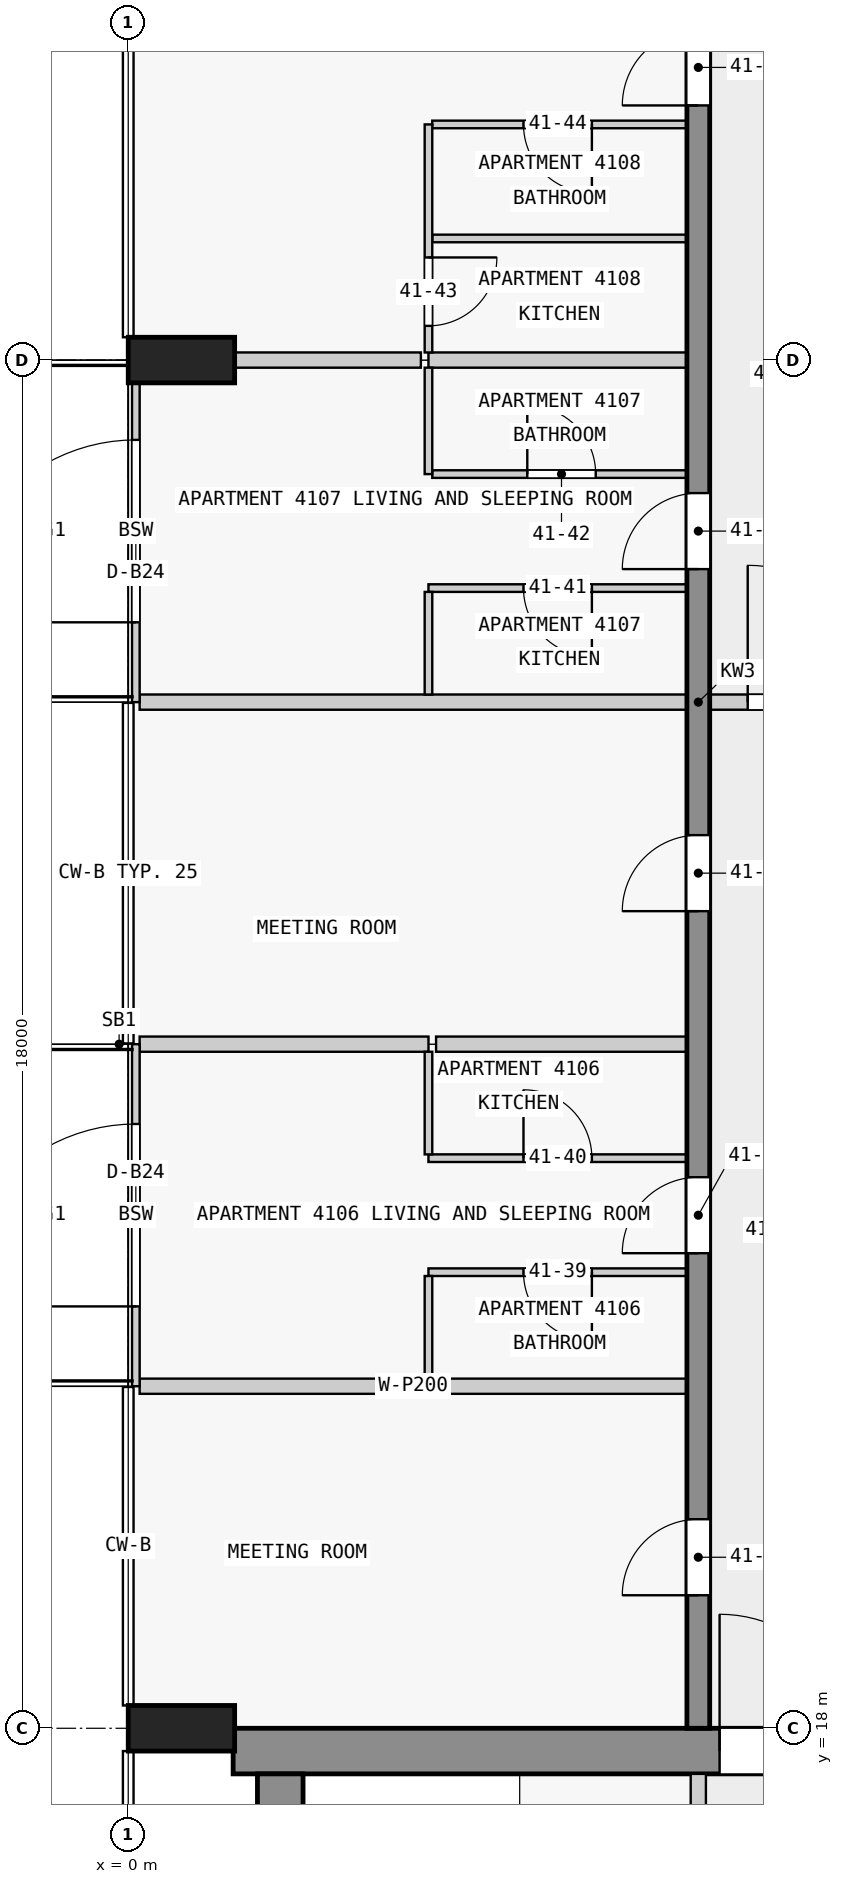
"""IFC4 building model, lengths in metres.
Left out: names, types, materials, properties, quantities, classifications, styles, units other than length and angle.
Written with IfcOpenShell. Run it as: python <this file> out.ifc"""

import sys

from ifc_helpers import new_model, si_unit, direction, frame, frame_2d, origin, origin_2d, place, context, subcontext, project, spatial, rectangle, extrude, element, fill, save


model = new_model("IFC4")
c1 = context("Model", 3, precision=1e-05, world=origin(), true_north=direction((0.0, 1.0)))
c2 = subcontext(c1, "Body", "Model", "MODEL_VIEW")
j1 = project(units=[si_unit("LENGTHUNIT", "METRE"), si_unit("PLANEANGLEUNIT", "RADIAN")], contexts=[c1])
p1 = place(None, origin())
s1 = spatial("IfcSite", under=j1, at=p1, CompositionType="ELEMENT")
p2 = place(p1, origin())
s2 = spatial("IfcBuilding", under=s1, at=p2, CompositionType="ELEMENT")
p3 = place(p2, frame((0.0, 0.0, 160.4)))
s3 = spatial("IfcBuildingStorey", under=s2, at=p3, CompositionType="ELEMENT", Elevation=160.4)
for number, where, z_axis, x_axis in (
    (1, (0.7, 36.0, 0.0), (0.0, 0.0, 1.0), (0.0, 1.0, 0.0)),
    (2, (0.7, 18.0, 0.0), (0.0, 0.0, 1.0), (0.0, 1.0, 0.0)),
):
    element("IfcColumn", number, at=place(p3, frame(where, z_axis=z_axis, x_axis=x_axis)), inside=s3, PredefinedType="COLUMN", context=c2, shape_type="SweptSolid", body=[
        extrude(rectangle(XDim=0.6, YDim=1.4, at=origin_2d()), origin(), (0.0, 0.0, 1.0), 3.5),
    ])
p4 = place(p3, frame((1.38, 17.7, 0.0), z_axis=(0.0, 0.0, 1.0), x_axis=(1.0, 0.0, 0.0)))
e3 = element("IfcWall", 3, at=p4, inside=s3, PredefinedType="SHEAR", context=c2, shape_type="SweptSolid", body=[
    extrude(rectangle(XDim=21.12, YDim=0.6, at=frame_2d((10.56, 0.0))), origin(), (0.0, 0.0, 1.0), 3.25),
])
p5 = place(p4, frame((6.4, 0.0, 0.0)))
e4 = element("IfcOpeningElement", 4, at=p5, cuts=e3, PredefinedType="OPENING", context=c2, shape_type="SweptSolid", body=[
    extrude(rectangle(XDim=1.8, YDim=2.1, at=frame_2d((0.9, 1.05))), frame((0.0, 0.31, 0.0), z_axis=(0.0, -1.0, 0.0), x_axis=(1.0, 0.0, 0.0)), (0.0, 0.0, 1.0), 0.62),
])
p6 = place(p3, frame((2.0, 2.5, 0.0), z_axis=(0.0, 0.0, 1.0), x_axis=(0.0, 1.0, 0.0)))
e5 = element("IfcWall", 5, at=p6, inside=s3, PredefinedType="SHEAR", context=c2, shape_type="SweptSolid", body=[
    extrude(rectangle(XDim=14.9, YDim=0.6, at=frame_2d((7.45, 0.0))), origin(), (0.0, 0.0, 1.0), 3.25),
])
p7 = place(p3, frame((7.5, 18.0, 0.0), z_axis=(0.0, 0.0, 1.0), x_axis=(0.0, 1.0, 0.0)))
e6 = element("IfcWall", 6, at=p7, inside=s3, PredefinedType="SHEAR", context=c2, shape_type="SweptSolid", body=[
    extrude(rectangle(XDim=27.0, YDim=0.3, at=frame_2d((13.5, 0.0))), origin(), (0.0, 0.0, 1.0), 3.25),
])
p8 = place(p7, frame((1.75, 0.0, 0.0)))
e7 = element("IfcOpeningElement", 7, at=p8, cuts=e6, PredefinedType="OPENING", context=c2, shape_type="SweptSolid", body=[
    extrude(rectangle(XDim=1.0, YDim=2.1, at=frame_2d((0.5, 1.05))), frame((0.0, 0.16, 0.0), z_axis=(0.0, -1.0, 0.0), x_axis=(1.0, 0.0, 0.0)), (0.0, 0.0, 1.0), 0.32),
])
p9 = place(p7, frame((6.25, 0.0, 0.0)))
e8 = element("IfcOpeningElement", 8, at=p9, cuts=e6, PredefinedType="OPENING", context=c2, shape_type="SweptSolid", body=[
    extrude(rectangle(XDim=1.0, YDim=2.1, at=frame_2d((0.5, 1.05))), frame((0.0, 0.16, 0.0), z_axis=(0.0, -1.0, 0.0), x_axis=(1.0, 0.0, 0.0)), (0.0, 0.0, 1.0), 0.32),
])
p10 = place(p7, frame((10.75, 0.0, 0.0)))
e9 = element("IfcOpeningElement", 9, at=p10, cuts=e6, PredefinedType="OPENING", context=c2, shape_type="SweptSolid", body=[
    extrude(rectangle(XDim=1.0, YDim=2.1, at=frame_2d((0.5, 1.05))), frame((0.0, 0.16, 0.0), z_axis=(0.0, -1.0, 0.0), x_axis=(1.0, 0.0, 0.0)), (0.0, 0.0, 1.0), 0.32),
])
p11 = place(p7, frame((15.25, 0.0, 0.0)))
e10 = element("IfcOpeningElement", 10, at=p11, cuts=e6, PredefinedType="OPENING", context=c2, shape_type="SweptSolid", body=[
    extrude(rectangle(XDim=1.0, YDim=2.1, at=frame_2d((0.5, 1.05))), frame((0.0, 0.16, 0.0), z_axis=(0.0, -1.0, 0.0), x_axis=(1.0, 0.0, 0.0)), (0.0, 0.0, 1.0), 0.32),
])
p12 = place(p7, frame((21.35, 0.0, 0.0)))
e11 = element("IfcOpeningElement", 11, at=p12, cuts=e6, PredefinedType="OPENING", context=c2, shape_type="SweptSolid", body=[
    extrude(rectangle(XDim=1.0, YDim=2.1, at=frame_2d((0.5, 1.05))), frame((0.0, 0.16, 0.0), z_axis=(0.0, -1.0, 0.0), x_axis=(1.0, 0.0, 0.0)), (0.0, 0.0, 1.0), 0.32),
])
p13 = place(p3, frame((0.1, 22.5, 0.0), z_axis=(0.0, 0.0, 1.0), x_axis=(0.0, 1.0, 0.0)))
e12 = element("IfcWall", 12, at=p13, inside=s3, PredefinedType="STANDARD", context=c2, shape_type="SweptSolid", body=[
    extrude(rectangle(XDim=4.5, YDim=0.1, at=frame_2d((2.25, 0.0))), origin(), (0.0, 0.0, 1.0), 3.25),
])
p14 = place(p13, frame((1.05, 0.0, 0.0)))
e13 = element("IfcOpeningElement", 13, at=p14, cuts=e12, PredefinedType="OPENING", context=c2, shape_type="SweptSolid", body=[
    extrude(rectangle(XDim=2.4, YDim=2.4, at=frame_2d((1.2, 1.2))), frame((0.0, 0.06, 0.0), z_axis=(0.0, -1.0, 0.0), x_axis=(1.0, 0.0, 0.0)), (0.0, 0.0, 1.0), 0.12),
])
p15 = place(p3, frame((0.1, 31.5, 0.0), z_axis=(0.0, 0.0, 1.0), x_axis=(0.0, 1.0, 0.0)))
e14 = element("IfcWall", 14, at=p15, inside=s3, PredefinedType="STANDARD", context=c2, shape_type="SweptSolid", body=[
    extrude(rectangle(XDim=4.5, YDim=0.1, at=frame_2d((2.25, 0.0))), origin(), (0.0, 0.0, 1.0), 3.25),
])
p16 = place(p15, frame((1.05, 0.0, 0.0)))
e15 = element("IfcOpeningElement", 15, at=p16, cuts=e14, PredefinedType="OPENING", context=c2, shape_type="SweptSolid", body=[
    extrude(rectangle(XDim=2.4, YDim=2.4, at=frame_2d((1.2, 1.2))), frame((0.0, 0.06, 0.0), z_axis=(0.0, -1.0, 0.0), x_axis=(1.0, 0.0, 0.0)), (0.0, 0.0, 1.0), 0.12),
])
p17 = place(p3, frame((7.5, 10.1, 0.0), z_axis=(0.0, 0.0, 1.0), x_axis=(0.0, 1.0, 0.0)))
e16 = element("IfcWall", 16, at=p17, inside=s3, PredefinedType="PARTITIONING", context=c2, shape_type="SweptSolid", body=[
    extrude(rectangle(XDim=7.3, YDim=0.2, at=frame_2d((3.65, 0.0))), origin(), (0.0, 0.0, 1.0), 3.25),
])
p18 = place(p17, frame((1.05, 0.0, 0.0)))
e17 = element("IfcOpeningElement", 17, at=p18, cuts=e16, PredefinedType="OPENING", context=c2, shape_type="SweptSolid", body=[
    extrude(rectangle(XDim=0.9, YDim=2.1, at=frame_2d((0.45, 1.05))), frame((0.0, 0.11, 0.0), z_axis=(0.0, -1.0, 0.0), x_axis=(1.0, 0.0, 0.0)), (0.0, 0.0, 1.0), 0.22),
])
p19 = place(p17, frame((4.7, 0.0, 0.0)))
e18 = element("IfcOpeningElement", 18, at=p19, cuts=e16, PredefinedType="OPENING", context=c2, shape_type="SweptSolid", body=[
    extrude(rectangle(XDim=0.9, YDim=2.1, at=frame_2d((0.45, 1.05))), frame((0.0, 0.11, 0.0), z_axis=(0.0, -1.0, 0.0), x_axis=(1.0, 0.0, 0.0)), (0.0, 0.0, 1.0), 0.22),
])
p20 = place(p3, frame((7.35, 22.5, 0.0), z_axis=(0.0, 0.0, 1.0), x_axis=(-1.0, 0.0, 0.0)))
e19 = element("IfcWall", 19, at=p20, inside=s3, PredefinedType="PARTITIONING", context=c2, shape_type="SweptSolid", body=[
    extrude(rectangle(XDim=7.2, YDim=0.2, at=frame_2d((3.6, 0.0))), origin(), (0.0, 0.0, 1.0), 3.25),
])
p21 = place(p3, frame((7.35, 24.0, 0.0), z_axis=(0.0, 0.0, 1.0), x_axis=(-1.0, 0.0, 0.0)))
e20 = element("IfcWall", 20, at=p21, inside=s3, PredefinedType="PARTITIONING", context=c2, shape_type="SweptSolid", body=[
    extrude(rectangle(XDim=3.4, YDim=0.1, at=frame_2d((1.7, 0.0))), origin(), (0.0, 0.0, 1.0), 3.25),
])
p22 = place(p21, frame((1.25, 0.0, 0.0)))
e21 = element("IfcOpeningElement", 21, at=p22, cuts=e20, PredefinedType="OPENING", context=c2, shape_type="SweptSolid", body=[
    extrude(rectangle(XDim=0.9, YDim=2.1, at=frame_2d((0.45, 1.05))), frame((0.0, 0.06, 0.0), z_axis=(0.0, -1.0, 0.0), x_axis=(1.0, 0.0, 0.0)), (0.0, 0.0, 1.0), 0.12),
])
p23 = place(p3, frame((3.95, 25.5, 0.0), z_axis=(0.0, 0.0, 1.0), x_axis=(1.0, 0.0, 0.0)))
e22 = element("IfcWall", 22, at=p23, inside=s3, PredefinedType="PARTITIONING", context=c2, shape_type="SweptSolid", body=[
    extrude(rectangle(XDim=3.4, YDim=0.1, at=frame_2d((1.7, 0.0))), origin(), (0.0, 0.0, 1.0), 3.25),
])
p24 = place(p23, frame((1.25, 0.0, 0.0)))
e23 = element("IfcOpeningElement", 23, at=p24, cuts=e22, PredefinedType="OPENING", context=c2, shape_type="SweptSolid", body=[
    extrude(rectangle(XDim=0.9, YDim=2.1, at=frame_2d((0.45, 1.05))), frame((0.0, 0.06, 0.0), z_axis=(0.0, -1.0, 0.0), x_axis=(1.0, 0.0, 0.0)), (0.0, 0.0, 1.0), 0.12),
])
p25 = place(p3, frame((7.35, 27.0, 0.0), z_axis=(0.0, 0.0, 1.0), x_axis=(-1.0, 0.0, 0.0)))
e24 = element("IfcWall", 24, at=p25, inside=s3, PredefinedType="PARTITIONING", context=c2, shape_type="SweptSolid", body=[
    extrude(rectangle(XDim=3.3, YDim=0.2, at=frame_2d((1.65, 0.0))), origin(), (0.0, 0.0, 1.0), 3.25),
])
p26 = place(p3, frame((0.15, 27.0, 0.0), z_axis=(0.0, 0.0, 1.0), x_axis=(1.0, 0.0, 0.0)))
e25 = element("IfcWall", 25, at=p26, inside=s3, PredefinedType="PARTITIONING", context=c2, shape_type="SweptSolid", body=[
    extrude(rectangle(XDim=3.8, YDim=0.2, at=frame_2d((1.9, 0.0))), origin(), (0.0, 0.0, 1.0), 3.25),
])
p27 = place(p3, frame((7.35, 31.5, 0.0), z_axis=(0.0, 0.0, 1.0), x_axis=(-1.0, 0.0, 0.0)))
e26 = element("IfcWall", 26, at=p27, inside=s3, PredefinedType="PARTITIONING", context=c2, shape_type="SweptSolid", body=[
    extrude(rectangle(XDim=7.2, YDim=0.2, at=frame_2d((3.6, 0.0))), origin(), (0.0, 0.0, 1.0), 3.25),
])
p28 = place(p3, frame((7.35, 33.0, 0.0), z_axis=(0.0, 0.0, 1.0), x_axis=(-1.0, 0.0, 0.0)))
e27 = element("IfcWall", 27, at=p28, inside=s3, PredefinedType="PARTITIONING", context=c2, shape_type="SweptSolid", body=[
    extrude(rectangle(XDim=3.4, YDim=0.1, at=frame_2d((1.7, 0.0))), origin(), (0.0, 0.0, 1.0), 3.25),
])
p29 = place(p28, frame((1.25, 0.0, 0.0)))
e28 = element("IfcOpeningElement", 28, at=p29, cuts=e27, PredefinedType="OPENING", context=c2, shape_type="SweptSolid", body=[
    extrude(rectangle(XDim=0.9, YDim=2.1, at=frame_2d((0.45, 1.05))), frame((0.0, 0.06, 0.0), z_axis=(0.0, -1.0, 0.0), x_axis=(1.0, 0.0, 0.0)), (0.0, 0.0, 1.0), 0.12),
])
p30 = place(p3, frame((4.0, 34.5, 0.0), z_axis=(0.0, 0.0, 1.0), x_axis=(1.0, 0.0, 0.0)))
e29 = element("IfcWall", 29, at=p30, inside=s3, PredefinedType="PARTITIONING", context=c2, shape_type="SweptSolid", body=[
    extrude(rectangle(XDim=3.35, YDim=0.1, at=frame_2d((1.675, 0.0))), origin(), (0.0, 0.0, 1.0), 3.25),
])
p31 = place(p30, frame((1.25, 0.0, 0.0)))
e30 = element("IfcOpeningElement", 30, at=p31, cuts=e29, PredefinedType="OPENING", context=c2, shape_type="SweptSolid", body=[
    extrude(rectangle(XDim=0.9, YDim=2.1, at=frame_2d((0.45, 1.05))), frame((0.0, 0.06, 0.0), z_axis=(0.0, -1.0, 0.0), x_axis=(1.0, 0.0, 0.0)), (0.0, 0.0, 1.0), 0.12),
])
p32 = place(p3, frame((7.35, 36.0, 0.0), z_axis=(0.0, 0.0, 1.0), x_axis=(-1.0, 0.0, 0.0)))
e31 = element("IfcWall", 31, at=p32, inside=s3, PredefinedType="PARTITIONING", context=c2, shape_type="SweptSolid", body=[
    extrude(rectangle(XDim=3.4, YDim=0.2, at=frame_2d((1.7, 0.0))), origin(), (0.0, 0.0, 1.0), 3.25),
])
p33 = place(p3, frame((1.4, 36.0, 0.0), z_axis=(0.0, 0.0, 1.0), x_axis=(1.0, 0.0, 0.0)))
e32 = element("IfcWall", 32, at=p33, inside=s3, PredefinedType="PARTITIONING", context=c2, shape_type="SweptSolid", body=[
    extrude(rectangle(XDim=2.45, YDim=0.2, at=frame_2d((1.225, 0.0))), origin(), (0.0, 0.0, 1.0), 3.25),
])
p34 = place(p3, frame((7.35, 37.6, 0.0), z_axis=(0.0, 0.0, 1.0), x_axis=(-1.0, 0.0, 0.0)))
e33 = element("IfcWall", 33, at=p34, inside=s3, PredefinedType="PARTITIONING", context=c2, shape_type="SweptSolid", body=[
    extrude(rectangle(XDim=3.35, YDim=0.1, at=frame_2d((1.675, 0.0))), origin(), (0.0, 0.0, 1.0), 3.25),
])
p35 = place(p3, frame((7.35, 39.1, 0.0), z_axis=(0.0, 0.0, 1.0), x_axis=(-1.0, 0.0, 0.0)))
e34 = element("IfcWall", 34, at=p35, inside=s3, PredefinedType="PARTITIONING", context=c2, shape_type="SweptSolid", body=[
    extrude(rectangle(XDim=3.35, YDim=0.1, at=frame_2d((1.675, 0.0))), origin(), (0.0, 0.0, 1.0), 3.25),
])
p36 = place(p35, frame((1.25, 0.0, 0.0)))
e35 = element("IfcOpeningElement", 35, at=p36, cuts=e34, PredefinedType="OPENING", context=c2, shape_type="SweptSolid", body=[
    extrude(rectangle(XDim=0.9, YDim=2.1, at=frame_2d((0.45, 1.05))), frame((0.0, 0.06, 0.0), z_axis=(0.0, -1.0, 0.0), x_axis=(1.0, 0.0, 0.0)), (0.0, 0.0, 1.0), 0.12),
])
for number, where, z_axis, x_axis in (
    (36, (3.95, 23.95, 0.0), (0.0, 0.0, 1.0), (0.0, -1.0, 0.0)),
    (37, (3.95, 26.9, 0.0), (0.0, 0.0, 1.0), (0.0, -1.0, 0.0)),
    (38, (3.95, 32.95, 0.0), (0.0, 0.0, 1.0), (0.0, -1.0, 0.0)),
):
    element("IfcWall", number, at=place(p3, frame(where, z_axis=z_axis, x_axis=x_axis)), inside=s3, PredefinedType="PARTITIONING", context=c2, shape_type="SweptSolid", body=[
        extrude(rectangle(XDim=1.35, YDim=0.1, at=frame_2d((0.675, 0.0))), origin(), (0.0, 0.0, 1.0), 3.25),
    ])
p37 = place(p3, frame((3.95, 35.9, 0.0), z_axis=(0.0, 0.0, 1.0), x_axis=(0.0, -1.0, 0.0)))
e39 = element("IfcWall", 39, at=p37, inside=s3, PredefinedType="PARTITIONING", context=c2, shape_type="SweptSolid", body=[
    extrude(rectangle(XDim=1.4, YDim=0.1, at=frame_2d((0.7, 0.0))), origin(), (0.0, 0.0, 1.0), 3.25),
])
p38 = place(p3, frame((3.95, 39.1, 0.0), z_axis=(0.0, 0.0, 1.0), x_axis=(0.0, -1.0, 0.0)))
e40 = element("IfcWall", 40, at=p38, inside=s3, PredefinedType="PARTITIONING", context=c2, shape_type="SweptSolid", body=[
    extrude(rectangle(XDim=3.0, YDim=0.1, at=frame_2d((1.5, 0.0))), origin(), (0.0, 0.0, 1.0), 3.25),
])
p39 = place(p38, frame((1.75, 0.0, 0.0)))
e41 = element("IfcOpeningElement", 41, at=p39, cuts=e40, PredefinedType="OPENING", context=c2, shape_type="SweptSolid", body=[
    extrude(rectangle(XDim=0.9, YDim=2.1, at=frame_2d((0.45, 1.05))), frame((0.0, 0.06, 0.0), z_axis=(0.0, -1.0, 0.0), x_axis=(1.0, 0.0, 0.0)), (0.0, 0.0, 1.0), 0.12),
])
p40 = place(p3, frame((7.45, 31.5, 0.0), z_axis=(0.0, 0.0, 1.0), x_axis=(1.0, 0.0, 0.0)))
e42 = element("IfcWall", 42, at=p40, inside=s3, PredefinedType="PARTITIONING", context=c2, shape_type="SweptSolid", body=[
    extrude(rectangle(XDim=3.1, YDim=0.2, at=frame_2d((1.55, 0.0))), origin(), (0.0, 0.0, 1.0), 3.25),
])
p41 = place(p40, frame((0.7, 0.0, 0.0)))
e43 = element("IfcOpeningElement", 43, at=p41, cuts=e42, PredefinedType="OPENING", context=c2, shape_type="SweptSolid", body=[
    extrude(rectangle(XDim=1.8, YDim=2.1, at=frame_2d((0.9, 1.05))), frame((0.0, 0.11, 0.0), z_axis=(0.0, -1.0, 0.0), x_axis=(1.0, 0.0, 0.0)), (0.0, 0.0, 1.0), 0.22),
])
p42 = place(p14, origin())
e44 = element("IfcDoor", 44, at=p42, inside=s3, OperationType="SINGLE_SWING_LEFT", PredefinedType="DOOR", context=c2, shape_type="SweptSolid", body=[
    extrude(rectangle(XDim=2.4, YDim=2.4, at=frame_2d((1.2, 1.2))), frame((0.0, 0.025, 0.0), z_axis=(0.0, -1.0, 0.0), x_axis=(1.0, 0.0, 0.0)), (0.0, 0.0, 1.0), 0.05),
])
fill(e13, e44)
p43 = place(p16, origin())
e45 = element("IfcDoor", 45, at=p43, inside=s3, OperationType="SINGLE_SWING_LEFT", PredefinedType="DOOR", context=c2, shape_type="SweptSolid", body=[
    extrude(rectangle(XDim=2.4, YDim=2.4, at=frame_2d((1.2, 1.2))), frame((0.0, 0.025, 0.0), z_axis=(0.0, -1.0, 0.0), x_axis=(1.0, 0.0, 0.0)), (0.0, 0.0, 1.0), 0.05),
])
fill(e15, e45)
p44 = place(p5, origin())
e46 = element("IfcDoor", 46, at=p44, inside=s3, OperationType="DOUBLE_DOOR_SINGLE_SWING", PredefinedType="DOOR", context=c2, shape_type="SweptSolid", body=[
    extrude(rectangle(XDim=1.8, YDim=2.1, at=frame_2d((0.9, 1.05))), frame((0.0, 0.025, 0.0), z_axis=(0.0, -1.0, 0.0), x_axis=(1.0, 0.0, 0.0)), (0.0, 0.0, 1.0), 0.05),
])
fill(e4, e46)
p45 = place(p8, origin())
e47 = element("IfcDoor", 47, at=p45, inside=s3, OperationType="SINGLE_SWING_LEFT", PredefinedType="DOOR", context=c2, shape_type="SweptSolid", body=[
    extrude(rectangle(XDim=1.0, YDim=2.1, at=frame_2d((0.5, 1.05))), frame((0.0, 0.025, 0.0), z_axis=(0.0, -1.0, 0.0), x_axis=(1.0, 0.0, 0.0)), (0.0, 0.0, 1.0), 0.05),
])
fill(e7, e47)
p46 = place(p9, origin())
e48 = element("IfcDoor", 48, at=p46, inside=s3, OperationType="SINGLE_SWING_LEFT", PredefinedType="DOOR", context=c2, shape_type="SweptSolid", body=[
    extrude(rectangle(XDim=1.0, YDim=2.1, at=frame_2d((0.5, 1.05))), frame((0.0, 0.025, 0.0), z_axis=(0.0, -1.0, 0.0), x_axis=(1.0, 0.0, 0.0)), (0.0, 0.0, 1.0), 0.05),
])
fill(e8, e48)
p47 = place(p10, origin())
e49 = element("IfcDoor", 49, at=p47, inside=s3, OperationType="SINGLE_SWING_LEFT", PredefinedType="DOOR", context=c2, shape_type="SweptSolid", body=[
    extrude(rectangle(XDim=1.0, YDim=2.1, at=frame_2d((0.5, 1.05))), frame((0.0, 0.025, 0.0), z_axis=(0.0, -1.0, 0.0), x_axis=(1.0, 0.0, 0.0)), (0.0, 0.0, 1.0), 0.05),
])
fill(e9, e49)
p48 = place(p11, origin())
e50 = element("IfcDoor", 50, at=p48, inside=s3, OperationType="SINGLE_SWING_RIGHT", PredefinedType="DOOR", context=c2, shape_type="SweptSolid", body=[
    extrude(rectangle(XDim=1.0, YDim=2.1, at=frame_2d((0.5, 1.05))), frame((0.0, 0.025, 0.0), z_axis=(0.0, -1.0, 0.0), x_axis=(1.0, 0.0, 0.0)), (0.0, 0.0, 1.0), 0.05),
])
fill(e10, e50)
p49 = place(p12, origin())
e51 = element("IfcDoor", 51, at=p49, inside=s3, OperationType="SINGLE_SWING_RIGHT", PredefinedType="DOOR", context=c2, shape_type="SweptSolid", body=[
    extrude(rectangle(XDim=1.0, YDim=2.1, at=frame_2d((0.5, 1.05))), frame((0.0, 0.025, 0.0), z_axis=(0.0, -1.0, 0.0), x_axis=(1.0, 0.0, 0.0)), (0.0, 0.0, 1.0), 0.05),
])
fill(e11, e51)
p50 = place(p41, origin())
e52 = element("IfcDoor", 52, at=p50, inside=s3, OperationType="SINGLE_SWING_RIGHT", PredefinedType="DOOR", context=c2, shape_type="SweptSolid", body=[
    extrude(rectangle(XDim=1.8, YDim=2.1, at=frame_2d((0.9, 1.05))), frame((0.0, 0.025, 0.0), z_axis=(0.0, -1.0, 0.0), x_axis=(1.0, 0.0, 0.0)), (0.0, 0.0, 1.0), 0.05),
])
fill(e43, e52)
p51 = place(p22, origin())
e53 = element("IfcDoor", 53, at=p51, inside=s3, OperationType="SINGLE_SWING_RIGHT", PredefinedType="DOOR", context=c2, shape_type="SweptSolid", body=[
    extrude(rectangle(XDim=0.9, YDim=2.1, at=frame_2d((0.45, 1.05))), frame((0.0, 0.025, 0.0), z_axis=(0.0, -1.0, 0.0), x_axis=(1.0, 0.0, 0.0)), (0.0, 0.0, 1.0), 0.05),
])
fill(e21, e53)
p52 = place(p24, origin())
e54 = element("IfcDoor", 54, at=p52, inside=s3, OperationType="SINGLE_SWING_RIGHT", PredefinedType="DOOR", context=c2, shape_type="SweptSolid", body=[
    extrude(rectangle(XDim=0.9, YDim=2.1, at=frame_2d((0.45, 1.05))), frame((0.0, 0.025, 0.0), z_axis=(0.0, -1.0, 0.0), x_axis=(1.0, 0.0, 0.0)), (0.0, 0.0, 1.0), 0.05),
])
fill(e23, e54)
p53 = place(p29, origin())
e55 = element("IfcDoor", 55, at=p53, inside=s3, OperationType="SINGLE_SWING_RIGHT", PredefinedType="DOOR", context=c2, shape_type="SweptSolid", body=[
    extrude(rectangle(XDim=0.9, YDim=2.1, at=frame_2d((0.45, 1.05))), frame((0.0, 0.025, 0.0), z_axis=(0.0, -1.0, 0.0), x_axis=(1.0, 0.0, 0.0)), (0.0, 0.0, 1.0), 0.05),
])
fill(e28, e55)
p54 = place(p31, origin())
e56 = element("IfcDoor", 56, at=p54, inside=s3, OperationType="SINGLE_SWING_RIGHT", PredefinedType="DOOR", context=c2, shape_type="SweptSolid", body=[
    extrude(rectangle(XDim=0.9, YDim=2.1, at=frame_2d((0.45, 1.05))), frame((0.0, 0.025, 0.0), z_axis=(0.0, -1.0, 0.0), x_axis=(1.0, 0.0, 0.0)), (0.0, 0.0, 1.0), 0.05),
])
fill(e30, e56)
p55 = place(p39, origin())
e57 = element("IfcDoor", 57, at=p55, inside=s3, OperationType="SINGLE_SWING_RIGHT", PredefinedType="DOOR", context=c2, shape_type="SweptSolid", body=[
    extrude(rectangle(XDim=0.9, YDim=2.1, at=frame_2d((0.45, 1.05))), frame((0.0, 0.025, 0.0), z_axis=(0.0, -1.0, 0.0), x_axis=(1.0, 0.0, 0.0)), (0.0, 0.0, 1.0), 0.05),
])
fill(e41, e57)
p56 = place(p36, origin())
e58 = element("IfcDoor", 58, at=p56, inside=s3, OperationType="SINGLE_SWING_RIGHT", PredefinedType="DOOR", context=c2, shape_type="SweptSolid", body=[
    extrude(rectangle(XDim=0.9, YDim=2.1, at=frame_2d((0.45, 1.05))), frame((0.0, 0.025, 0.0), z_axis=(0.0, -1.0, 0.0), x_axis=(1.0, 0.0, 0.0)), (0.0, 0.0, 1.0), 0.05),
])
fill(e35, e58)
save(model, sys.argv[1])
